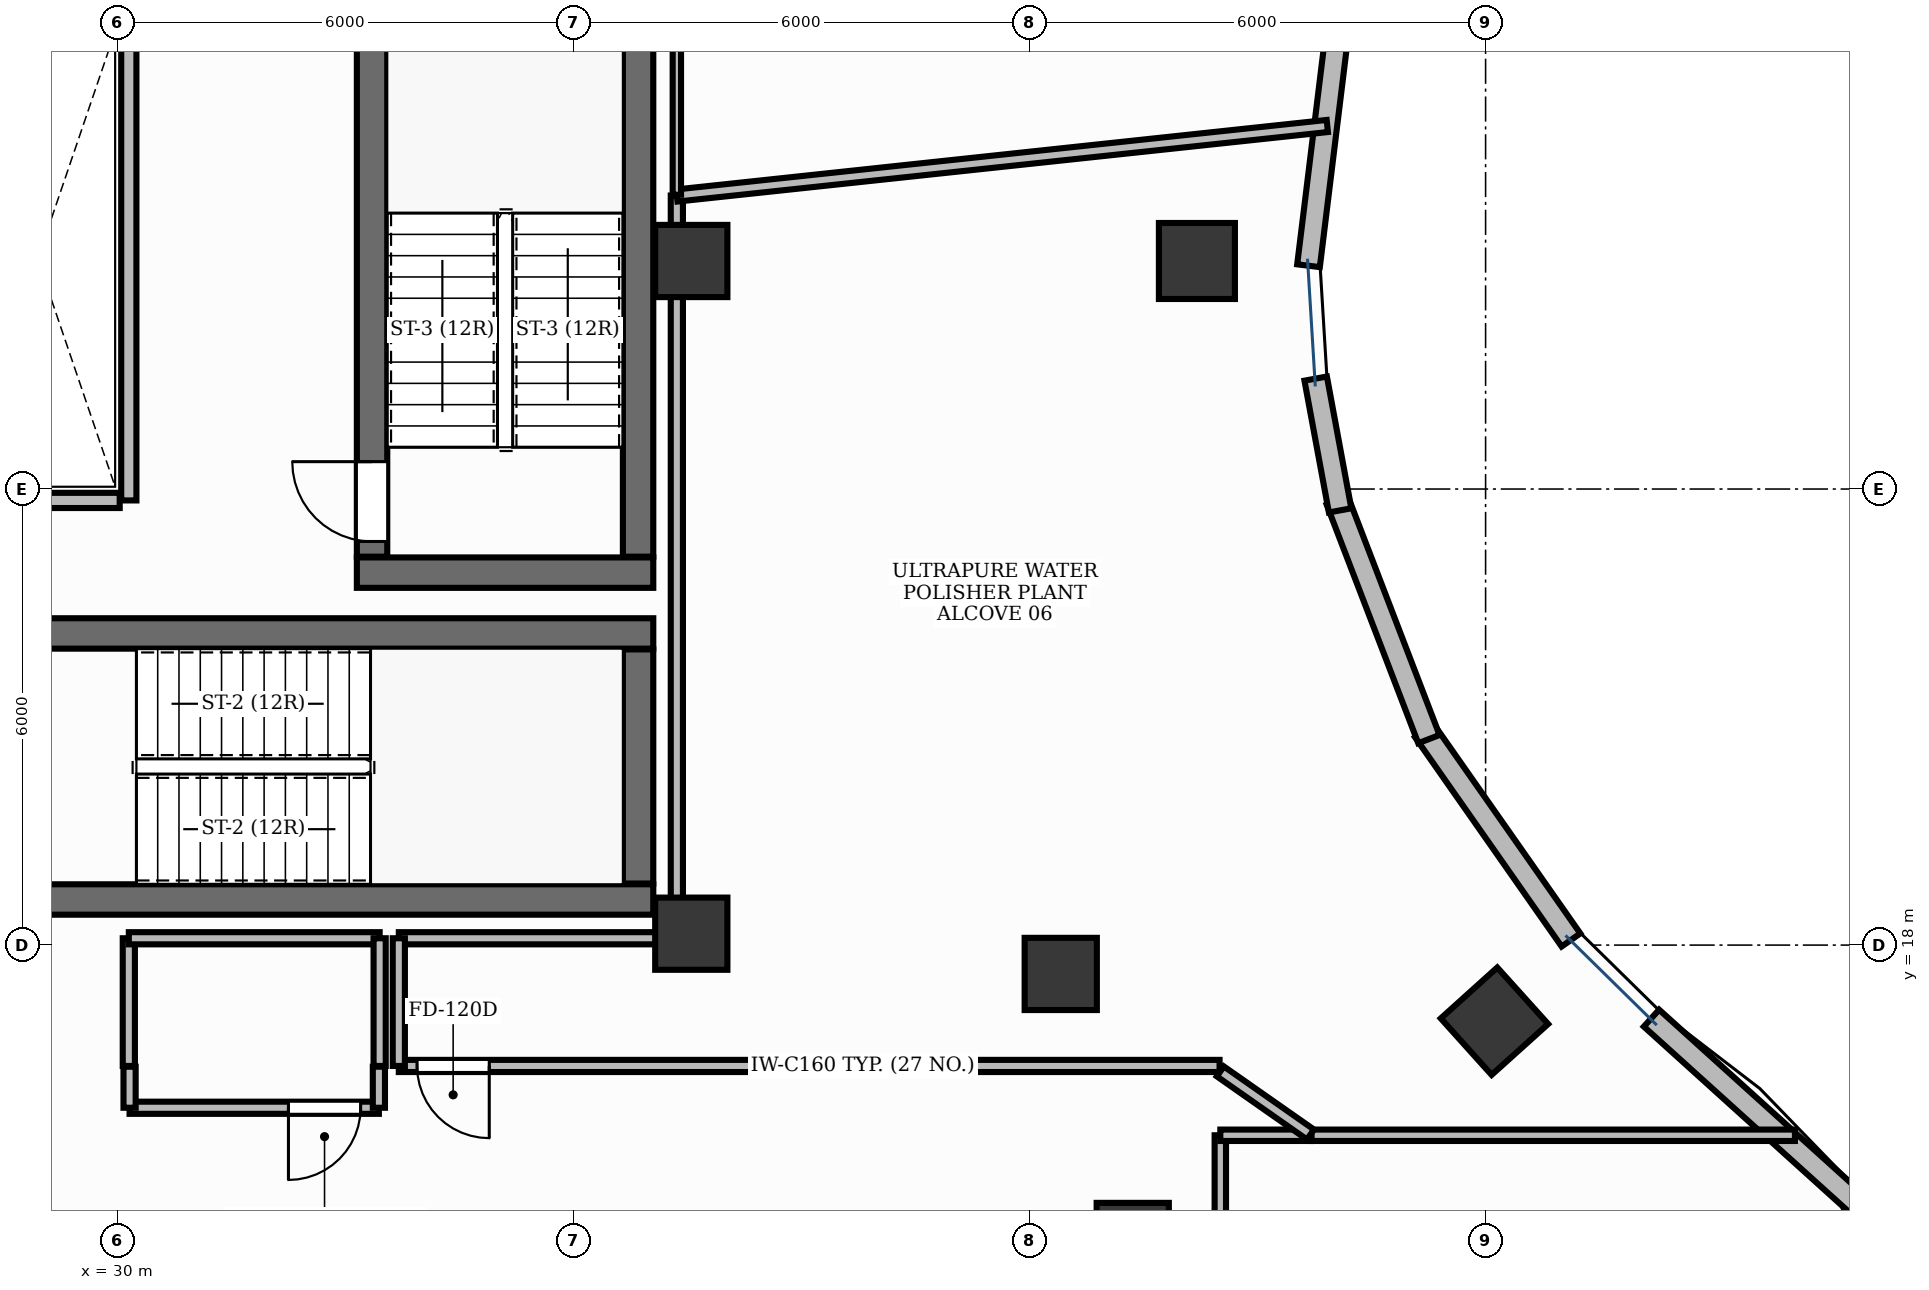
"""IFC4 building model, lengths in metres.
Left out: names, types, materials, properties, quantities, classifications, styles, units other than length and angle.
Written with IfcOpenShell. Run it as: python <this file> out.ifc"""

import sys

from ifc_helpers import new_model, si_unit, direction, frame, frame_2d, origin, origin_2d, place, context, subcontext, project, spatial, rectangle, extrude, element, fill, save


model = new_model("IFC4")
c1 = context("Model", 3, precision=1e-05, world=origin(), true_north=direction((0.0, 1.0)))
c2 = subcontext(c1, "Body", "Model", "MODEL_VIEW")
j1 = project(units=[si_unit("LENGTHUNIT", "METRE"), si_unit("PLANEANGLEUNIT", "RADIAN")], contexts=[c1])
p1 = place(None, origin())
s1 = spatial("IfcSite", under=j1, at=p1, CompositionType="ELEMENT")
p2 = place(p1, origin())
s2 = spatial("IfcBuilding", under=s1, at=p2, CompositionType="ELEMENT")
p3 = place(p2, frame((0.0, 0.0, 231.0)))
s3 = spatial("IfcBuildingStorey", under=s2, at=p3, CompositionType="ELEMENT", Elevation=231.0)
p4 = place(p3, frame((28.852, 18.6, 0.0), z_axis=(0.0, 0.0, 1.0), x_axis=(1.0, 0.0, 0.0)))
e1 = element("IfcWall", 1, at=p4, inside=s3, PredefinedType="SHEAR", context=c2, shape_type="SweptSolid", body=[
    extrude(rectangle(XDim=8.198, YDim=0.4, at=frame_2d((4.099, 0.0))), origin(), (0.0, 0.0, 1.0), 3.9),
])
p5 = place(p3, frame((28.4, 22.1, 0.0), z_axis=(0.0, 0.0, 1.0), x_axis=(1.0, 0.0, 0.0)))
e2 = element("IfcWall", 2, at=p5, inside=s3, PredefinedType="SHEAR", context=c2, shape_type="SweptSolid", body=[
    extrude(rectangle(XDim=8.65, YDim=0.4, at=frame_2d((4.325, 0.0))), origin(), (0.0, 0.0, 1.0), 3.9),
])
p6 = place(p3, frame((36.85, 18.81, 0.0), z_axis=(0.0, 0.0, 1.0), x_axis=(0.0, 1.0, 0.0)))
e3 = element("IfcWall", 3, at=p6, inside=s3, PredefinedType="SHEAR", context=c2, shape_type="SweptSolid", body=[
    extrude(rectangle(XDim=3.08, YDim=0.4, at=frame_2d((1.54, 0.0))), origin(), (0.0, 0.0, 1.0), 3.9),
])
p7 = place(p3, frame((33.15, 22.9, 0.0), z_axis=(0.0, 0.0, 1.0), x_axis=(1.0, 0.0, 0.0)))
e4 = element("IfcWall", 4, at=p7, inside=s3, PredefinedType="SHEAR", context=c2, shape_type="SweptSolid", body=[
    extrude(rectangle(XDim=3.9, YDim=0.4, at=frame_2d((1.95, 0.0))), origin(), (0.0, 0.0, 1.0), 3.9),
])
p8 = place(p3, frame((36.85, 23.11, 0.0), z_axis=(0.0, 0.0, 1.0), x_axis=(0.0, 1.0, 0.0)))
e5 = element("IfcWall", 5, at=p8, inside=s3, PredefinedType="SHEAR", context=c2, shape_type="SweptSolid", body=[
    extrude(rectangle(XDim=7.78, YDim=0.4, at=frame_2d((3.89, 0.0))), origin(), (0.0, 0.0, 1.0), 3.9),
])
p9 = place(p3, frame((33.35, 23.11, 0.0), z_axis=(0.0, 0.0, 1.0), x_axis=(0.0, 1.0, 0.0)))
e6 = element("IfcWall", 6, at=p9, inside=s3, PredefinedType="SHEAR", context=c2, shape_type="SweptSolid", body=[
    extrude(rectangle(XDim=7.78, YDim=0.4, at=frame_2d((3.89, 0.0))), origin(), (0.0, 0.0, 1.0), 3.9),
])
p10 = place(p9, frame((0.2, 0.0, 0.0)))
e7 = element("IfcOpeningElement", 7, at=p10, cuts=e6, PredefinedType="OPENING", context=c2, shape_type="SweptSolid", body=[
    extrude(rectangle(XDim=1.05, YDim=2.15, at=frame_2d((0.525, 1.075))), frame((0.0, 0.215, 0.0), z_axis=(0.0, -1.0, 0.0), x_axis=(1.0, 0.0, 0.0)), (0.0, 0.0, 1.0), 0.43),
])
for number, where, z_axis, x_axis in (
    (8, (37.55, 18.15, -0.0), (0.0, 0.0, 1.0), (1.0, 0.0, 0.0)),
    (9, (37.55, 27.0, -0.0), (0.0, 0.0, 1.0), (1.0, 0.0, 0.0)),
):
    element("IfcColumn", number, at=place(p3, frame(where, z_axis=z_axis, x_axis=x_axis)), inside=s3, PredefinedType="PILASTER", context=c2, shape_type="SweptSolid", body=[
        extrude(rectangle(XDim=0.95, YDim=0.95, at=origin_2d()), origin(), (0.0, 0.0, 1.0), 3.901),
    ])
p11 = place(p3, frame((43.358, 14.134, -0.0), z_axis=(0.0, 0.0, 1.0), x_axis=(1.0, 0.0, 0.0)))
e10 = element("IfcColumn", 10, at=p11, inside=s3, PredefinedType="COLUMN", context=c2, shape_type="SweptSolid", body=[
    extrude(rectangle(XDim=0.95, YDim=0.95, at=origin_2d()), origin(), (0.0, 0.0, 1.0), 3.901),
])
p12 = place(p3, frame((48.116, 16.999, -0.0), z_axis=(0.0, 0.0, 1.0), x_axis=(-0.669130606359, 0.743144825477, 0.0)))
e11 = element("IfcColumn", 11, at=p12, inside=s3, PredefinedType="COLUMN", context=c2, shape_type="SweptSolid", body=[
    extrude(rectangle(XDim=1.0, YDim=1.0, at=origin_2d()), origin(), (0.0, 0.0, 1.0), 3.901),
])
p13 = place(p3, frame((42.411, 17.62, -0.0), z_axis=(0.0, 0.0, 1.0), x_axis=(1.0, 0.0, 0.0)))
e12 = element("IfcColumn", 12, at=p13, inside=s3, PredefinedType="COLUMN", context=c2, shape_type="SweptSolid", body=[
    extrude(rectangle(XDim=0.95, YDim=0.95, at=origin_2d()), origin(), (0.0, 0.0, 1.0), 3.901),
])
p14 = place(p3, frame((44.202, 27.0, -0.0), z_axis=(0.0, 0.0, 1.0), x_axis=(0.0, 1.0, 0.0)))
e13 = element("IfcColumn", 13, at=p14, inside=s3, PredefinedType="COLUMN", context=c2, shape_type="SweptSolid", body=[
    extrude(rectangle(XDim=1.0, YDim=1.0, at=origin_2d()), origin(), (0.0, 0.0, 1.0), 3.901),
])
p15 = place(p3, frame((53.517, 12.791, 0.0), z_axis=(0.0, 0.0, 1.0), x_axis=(-0.346359858312, 0.93810172612, 0.0)))
e14 = element("IfcWall", 14, at=p15, inside=s3, PredefinedType="STANDARD", context=c2, shape_type="SweptSolid", body=[
    extrude(rectangle(XDim=2.091, YDim=0.3, at=frame_2d((1.046, 0.0))), origin(), (0.0, 0.0, 1.0), 3.9),
])
p16 = place(p3, frame((52.917, 14.569, 0.0), z_axis=(0.0, 0.0, 1.0), x_axis=(-0.742037796493, 0.670358045059, 0.0)))
e15 = element("IfcWall", 15, at=p16, inside=s3, PredefinedType="STANDARD", context=c2, shape_type="SweptSolid", body=[
    extrude(rectangle(XDim=3.685, YDim=0.3, at=frame_2d((1.843, 0.0))), origin(), (0.0, 0.0, 1.0), 3.9),
])
p17 = place(p3, frame((49.123, 18.067, 0.0), z_axis=(0.0, 0.0, 1.0), x_axis=(-0.573598849051, 0.819136350291, 0.0)))
e16 = element("IfcWall", 16, at=p17, inside=s3, PredefinedType="STANDARD", context=c2, shape_type="SweptSolid", body=[
    extrude(rectangle(XDim=3.361, YDim=0.3, at=frame_2d((1.68, 0.0))), origin(), (0.0, 0.0, 1.0), 3.9),
])
p18 = place(p3, frame((47.254, 20.71, 0.0), z_axis=(0.0, 0.0, 1.0), x_axis=(-0.358365624917, 0.933581318835, 0.0)))
e17 = element("IfcWall", 17, at=p18, inside=s3, PredefinedType="STANDARD", context=c2, shape_type="SweptSolid", body=[
    extrude(rectangle(XDim=3.361, YDim=0.3, at=frame_2d((1.68, 0.0))), origin(), (0.0, 0.0, 1.0), 3.9),
])
p19 = place(p3, frame((46.086, 23.719, 0.0), z_axis=(0.0, 0.0, 1.0), x_axis=(-0.182198328631, 0.983261800867, 0.0)))
e18 = element("IfcWall", 18, at=p19, inside=s3, PredefinedType="STANDARD", context=c2, shape_type="SweptSolid", body=[
    extrude(rectangle(XDim=1.763, YDim=0.3, at=frame_2d((0.882, 0.0))), origin(), (0.0, 0.0, 1.0), 3.9),
])
p20 = place(p3, frame((45.67, 26.938, 0.0), z_axis=(0.0, 0.0, 1.0), x_axis=(0.121834797873, 0.992550392689, 0.0)))
e19 = element("IfcWall", 19, at=p20, inside=s3, PredefinedType="STANDARD", context=c2, shape_type="SweptSolid", body=[
    extrude(rectangle(XDim=3.361, YDim=0.3, at=frame_2d((1.68, 0.0))), origin(), (0.0, 0.0, 1.0), 3.9),
])
p21 = place(p3, frame((30.15, 23.85, 0.0), z_axis=(0.0, 0.0, 1.0), x_axis=(0.0, 1.0, 0.0)))
e20 = element("IfcWall", 20, at=p21, inside=s3, PredefinedType="PARTITIONING", context=c2, shape_type="SweptSolid", body=[
    extrude(rectangle(XDim=6.35, YDim=0.2, at=frame_2d((3.175, 0.0))), origin(), (0.0, 0.0, 1.0), 2.91),
])
p22 = place(p3, frame((27.934, 23.85, 0.0), z_axis=(0.0, 0.0, 1.0), x_axis=(1.0, 0.0, 0.0)))
e21 = element("IfcWall", 21, at=p22, inside=s3, PredefinedType="PARTITIONING", context=c2, shape_type="SweptSolid", body=[
    extrude(rectangle(XDim=2.096, YDim=0.2, at=frame_2d((1.048, 0.0))), origin(), (0.0, 0.0, 1.0), 2.91),
])
p23 = place(p3, frame((33.44, 15.86, 0.0), z_axis=(0.0, 0.0, 1.0), x_axis=(-1.0, 0.0, 0.0)))
e22 = element("IfcWall", 22, at=p23, inside=s3, PredefinedType="PARTITIONING", context=c2, shape_type="SweptSolid", body=[
    extrude(rectangle(XDim=3.28, YDim=0.16, at=frame_2d((1.64, 0.0))), origin(), (0.0, 0.0, 1.0), 2.91),
])
p24 = place(p23, frame((0.24, 0.0, 0.0)))
e23 = element("IfcOpeningElement", 23, at=p24, cuts=e22, PredefinedType="OPENING", context=c2, shape_type="SweptSolid", body=[
    extrude(rectangle(XDim=0.95, YDim=2.15, at=frame_2d((0.475, 1.075))), frame((0.0, 0.095, 0.0), z_axis=(0.0, -1.0, 0.0), x_axis=(1.0, 0.0, 0.0)), (0.0, 0.0, 1.0), 0.19),
])
p25 = place(p3, frame((44.5, 16.41, 0.0), z_axis=(0.0, 0.0, 1.0), x_axis=(-1.0, 0.0, 0.0)))
e24 = element("IfcWall", 24, at=p25, inside=s3, PredefinedType="PARTITIONING", context=c2, shape_type="SweptSolid", body=[
    extrude(rectangle(XDim=10.798, YDim=0.16, at=frame_2d((5.399, 0.0))), origin(), (0.0, 0.0, 1.0), 2.91),
])
p26 = place(p25, frame((9.608, 0.0, 0.0)))
e25 = element("IfcOpeningElement", 25, at=p26, cuts=e24, PredefinedType="OPENING", context=c2, shape_type="SweptSolid", body=[
    extrude(rectangle(XDim=0.95, YDim=2.15, at=frame_2d((0.475, 1.075))), frame((0.0, 0.095, 0.0), z_axis=(0.0, -1.0, 0.0), x_axis=(1.0, 0.0, 0.0)), (0.0, 0.0, 1.0), 0.19),
])
for number, where, z_axis, x_axis in (
    (26, (33.44, 16.4, 0.0), (0.0, 0.0, 1.0), (0.0, -1.0, 0.0)),
    (27, (30.16, 15.86, 0.0), (0.0, 0.0, 1.0), (0.0, 1.0, 0.0)),
):
    element("IfcWall", number, at=place(p3, frame(where, z_axis=z_axis, x_axis=x_axis)), inside=s3, PredefinedType="PARTITIONING", context=c2, shape_type="SweptSolid", body=[
        extrude(rectangle(XDim=0.54, YDim=0.16, at=frame_2d((0.27, 0.0))), origin(), (0.0, 0.0, 1.0), 2.91),
    ])
p27 = place(p3, frame((30.15, 16.41, 0.0), z_axis=(0.0, 0.0, 1.0), x_axis=(0.0, 1.0, 0.0)))
e28 = element("IfcWall", 28, at=p27, inside=s3, PredefinedType="PARTITIONING", context=c2, shape_type="SweptSolid", body=[
    extrude(rectangle(XDim=1.68, YDim=0.16, at=frame_2d((0.84, 0.0))), origin(), (0.0, 0.0, 1.0), 2.91),
])
p28 = place(p3, frame((30.15, 18.09, 0.0), z_axis=(0.0, 0.0, 1.0), x_axis=(1.0, 0.0, 0.0)))
e29 = element("IfcWall", 29, at=p28, inside=s3, PredefinedType="PARTITIONING", context=c2, shape_type="SweptSolid", body=[
    extrude(rectangle(XDim=3.3, YDim=0.16, at=frame_2d((1.65, 0.0))), origin(), (0.0, 0.0, 1.0), 2.91),
])
p29 = place(p3, frame((33.45, 18.09, 0.0), z_axis=(0.0, 0.0, 1.0), x_axis=(0.0, -1.0, 0.0)))
e30 = element("IfcWall", 30, at=p29, inside=s3, PredefinedType="PARTITIONING", context=c2, shape_type="SweptSolid", body=[
    extrude(rectangle(XDim=1.68, YDim=0.16, at=frame_2d((0.84, 0.0))), origin(), (0.0, 0.0, 1.0), 2.91),
])
p30 = place(p3, frame((44.51, 12.6, 0.0), z_axis=(0.0, 0.0, 1.0), x_axis=(0.0, 1.0, 0.0)))
e31 = element("IfcWall", 31, at=p30, inside=s3, PredefinedType="PARTITIONING", context=c2, shape_type="SweptSolid", body=[
    extrude(rectangle(XDim=2.898, YDim=0.15, at=frame_2d((1.449, 0.0))), origin(), (0.0, 0.0, 1.0), 2.91),
])
p31 = place(p3, frame((44.51, 15.498, 0.0), z_axis=(0.0, 0.0, 1.0), x_axis=(1.0, 0.0, 0.0)))
e32 = element("IfcWall", 32, at=p31, inside=s3, PredefinedType="PARTITIONING", context=c2, shape_type="SweptSolid", body=[
    extrude(rectangle(XDim=1.193, YDim=0.15, at=frame_2d((0.596, 0.0))), origin(), (0.0, 0.0, 1.0), 2.91),
])
p32 = place(p3, frame((45.71, 15.498, 0.0), z_axis=(0.0, 0.0, 1.0), x_axis=(1.0, 0.0, 0.0)))
e33 = element("IfcWall", 33, at=p32, inside=s3, PredefinedType="PARTITIONING", context=c2, shape_type="SweptSolid", body=[
    extrude(rectangle(XDim=6.36, YDim=0.15, at=frame_2d((3.18, 0.0))), origin(), (0.0, 0.0, 1.0), 2.91),
])
p33 = place(p3, frame((33.702, 18.09, 0.0), z_axis=(0.0, 0.0, 1.0), x_axis=(1.0, 0.0, 0.0)))
e34 = element("IfcWall", 34, at=p33, inside=s3, PredefinedType="PARTITIONING", context=c2, shape_type="SweptSolid", body=[
    extrude(rectangle(XDim=3.648, YDim=0.16, at=frame_2d((1.824, 0.0))), origin(), (0.0, 0.0, 1.0), 2.91),
])
p34 = place(p3, frame((37.36, 18.1, 0.0), z_axis=(0.0, 0.0, 1.0), x_axis=(0.0, 1.0, 0.0)))
e35 = element("IfcWall", 35, at=p34, inside=s3, PredefinedType="PARTITIONING", context=c2, shape_type="SweptSolid", body=[
    extrude(rectangle(XDim=9.761, YDim=0.16, at=frame_2d((4.881, 0.0))), origin(), (0.0, 0.0, 1.0), 2.91),
])
p35 = place(p3, frame((37.36, 27.862, 0.0), z_axis=(0.0, 0.0, 1.0), x_axis=(0.994340555522, 0.106239633118, 0.0)))
e36 = element("IfcWall", 36, at=p35, inside=s3, PredefinedType="PARTITIONING", context=c2, shape_type="SweptSolid", body=[
    extrude(rectangle(XDim=8.606, YDim=0.16, at=frame_2d((4.303, 0.0))), origin(), (0.0, 0.0, 1.0), 2.91),
])
p36 = place(p3, frame((45.696, 15.508, 0.0), z_axis=(0.0, 0.0, 1.0), x_axis=(-0.819144755114, 0.573586846231, 0.0)))
e37 = element("IfcWall", 37, at=p36, inside=s3, PredefinedType="PARTITIONING", context=c2, shape_type="SweptSolid", body=[
    extrude(rectangle(XDim=1.448, YDim=0.16, at=frame_2d((0.724, 0.0))), origin(), (0.0, 0.0, 1.0), 2.91),
])
p37 = place(p3, frame((33.702, 16.41, 0.0), z_axis=(0.0, 0.0, 1.0), x_axis=(0.0, 1.0, 0.0)))
e38 = element("IfcWall", 38, at=p37, inside=s3, PredefinedType="PARTITIONING", context=c2, shape_type="SweptSolid", body=[
    extrude(rectangle(XDim=1.68, YDim=0.16, at=frame_2d((0.84, 0.0))), origin(), (0.0, 0.0, 1.0), 2.91),
])
p38 = place(p3, frame((37.36, 27.872, 0.0), z_axis=(0.0, 0.0, 1.0), x_axis=(0.0, 1.0, 0.0)))
e39 = element("IfcWall", 39, at=p38, inside=s3, PredefinedType="MOVABLE", context=c2, shape_type="SweptSolid", body=[
    extrude(rectangle(XDim=8.028, YDim=0.11, at=frame_2d((4.014, 0.0))), origin(), (0.0, 0.0, 1.0), 2.91),
])
p39 = place(p10, origin())
e40 = element("IfcDoor", 40, at=p39, inside=s3, OperationType="SINGLE_SWING_RIGHT", PredefinedType="DOOR", context=c2, shape_type="SweptSolid", body=[
    extrude(rectangle(XDim=1.05, YDim=2.15, at=frame_2d((0.525, 1.075))), frame((0.0, 0.025, 0.0), z_axis=(0.0, -1.0, 0.0), x_axis=(1.0, 0.0, 0.0)), (0.0, 0.0, 1.0), 0.05),
])
fill(e7, e40)
p40 = place(p24, origin())
e41 = element("IfcDoor", 41, at=p40, inside=s3, OperationType="SINGLE_SWING_RIGHT", PredefinedType="DOOR", context=c2, shape_type="SweptSolid", body=[
    extrude(rectangle(XDim=0.95, YDim=2.15, at=frame_2d((0.475, 1.075))), frame((0.0, 0.025, 0.0), z_axis=(0.0, -1.0, 0.0), x_axis=(1.0, 0.0, 0.0)), (0.0, 0.0, 1.0), 0.05),
])
fill(e23, e41)
p41 = place(p26, origin())
e42 = element("IfcDoor", 42, at=p41, inside=s3, OperationType="SINGLE_SWING_LEFT", PredefinedType="DOOR", context=c2, shape_type="SweptSolid", body=[
    extrude(rectangle(XDim=0.95, YDim=2.15, at=frame_2d((0.475, 1.075))), frame((0.0, 0.025, 0.0), z_axis=(0.0, -1.0, 0.0), x_axis=(1.0, 0.0, 0.0)), (0.0, 0.0, 1.0), 0.05),
])
fill(e25, e42)
save(model, sys.argv[1])
